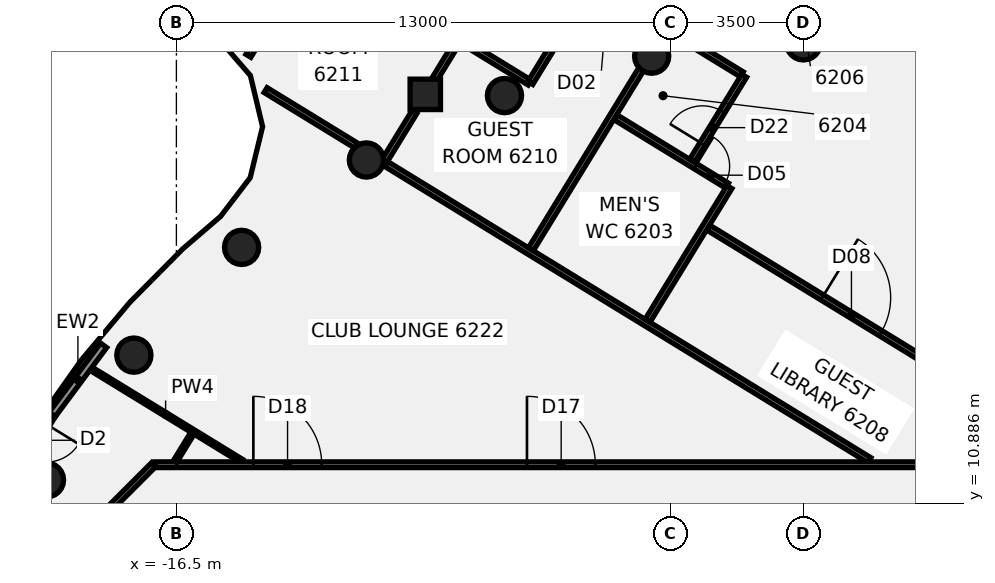
"""IFC4 building model, lengths in metres.
Left out: names, types, materials, properties, quantities, classifications, styles, units other than length and angle.
Written with IfcOpenShell. Run it as: python <this file> out.ifc"""

import sys

from ifc_helpers import new_model, si_unit, direction, frame, frame_2d, origin, origin_2d, place, context, subcontext, project, spatial, rectangle, circle, extrude, element, fill, save


model = new_model("IFC4")
c1 = context("Model", 3, precision=1e-05, world=origin(), true_north=direction((0.0, 1.0)))
c2 = subcontext(c1, "Body", "Model", "MODEL_VIEW")
j1 = project(units=[si_unit("LENGTHUNIT", "METRE"), si_unit("PLANEANGLEUNIT", "RADIAN")], contexts=[c1])
p1 = place(None, origin())
s1 = spatial("IfcSite", under=j1, at=p1, CompositionType="ELEMENT")
p2 = place(p1, origin())
s2 = spatial("IfcBuilding", under=s1, at=p2, CompositionType="ELEMENT")
p3 = place(p2, frame((0.0, 0.0, 245.1)))
s3 = spatial("IfcBuildingStorey", under=s2, at=p3, CompositionType="ELEMENT", Elevation=245.1)
for number, where, z_axis, x_axis in (
    (1, (0.0, 23.0, -0.14), (0.0, 0.0, 1.0), (1.0, 0.0, 0.0)),
    (2, (-3.994, 22.651, -0.14), (0.0, 0.0, 1.0), (1.0, 0.0, 0.0)),
    (3, (-7.866, 21.613, -0.14), (0.0, 0.0, 1.0), (1.0, 0.0, 0.0)),
    (4, (-11.5, 19.919, -0.14), (0.0, 0.0, 1.0), (1.0, 0.0, 0.0)),
    (5, (-14.784, 17.619, -0.14), (0.0, 0.0, 1.0), (1.0, 0.0, 0.0)),
    (6, (-17.619, 14.784, -0.14), (0.0, 0.0, 1.0), (1.0, 0.0, 0.0)),
    (7, (-19.919, 11.5, -0.14), (0.0, 0.0, 1.0), (1.0, 0.0, 0.0)),
):
    element("IfcColumn", number, at=place(p3, frame(where, z_axis=z_axis, x_axis=x_axis)), inside=s3, PredefinedType="COLUMN", context=c2, shape_type="SweptSolid", body=[
        extrude(circle(Radius=0.45, at=origin_2d()), origin(), (0.0, 0.0, 1.0), 3.6),
    ])
p4 = place(p3, frame((-9.951, 21.646, -0.139), z_axis=(0.002304349187, -0.050289032263, 0.998732047753), x_axis=(0.521494023038, 0.852234898638, 0.041709249322)))
e8 = element("IfcColumn", 8, at=p4, inside=s3, PredefinedType="COLUMN", context=c2, shape_type="SweptSolid", body=[
    extrude(rectangle(XDim=0.8, YDim=0.8, at=origin_2d()), origin(), (0.0, 0.0, 1.0), 3.602),
])
p5 = place(p3, frame((-14.153, 21.758, 0.0), z_axis=(0.0, 0.0, 1.0), x_axis=(0.852608746258, -0.522549830929, 0.0)))
e9 = element("IfcWall", 9, at=p5, inside=s3, PredefinedType="PARTITIONING", context=c2, shape_type="SweptSolid", body=[
    extrude(rectangle(XDim=2.809, YDim=0.15, at=frame_2d((1.405, 0.0))), origin(), (0.0, 0.0, 1.0), 2.864),
])
p6 = place(p3, frame((-10.983, 19.815, 0.0), z_axis=(0.0, 0.0, 1.0), x_axis=(0.852616070258, -0.522537880672, 0.0)))
e10 = element("IfcWall", 10, at=p6, inside=s3, PredefinedType="PARTITIONING", context=c2, shape_type="SweptSolid", body=[
    extrude(rectangle(XDim=14.918, YDim=0.15, at=frame_2d((7.459, 0.0))), origin(), (0.0, 0.0, 1.0), 2.864),
])
p7 = place(p3, frame((-10.875, 24.206, 0.0), z_axis=(0.0, 0.0, 1.0), x_axis=(0.852560498392, -0.522628545509, 0.0)))
e11 = element("IfcWall", 11, at=p7, inside=s3, PredefinedType="PARTITIONING", context=c2, shape_type="SweptSolid", body=[
    extrude(rectangle(XDim=4.305, YDim=0.15, at=frame_2d((2.153, 0.0))), origin(), (0.0, 0.0, 1.0), 2.864),
])
p8 = place(p3, frame((-4.948, 21.044, 0.0), z_axis=(0.0, 0.0, 1.0), x_axis=(0.85258902817, -0.52258200222, 0.0)))
e12 = element("IfcWall", 12, at=p8, inside=s3, PredefinedType="PARTITIONING", context=c2, shape_type="SweptSolid", body=[
    extrude(rectangle(XDim=3.445, YDim=0.15, at=frame_2d((1.722, 0.0))), origin(), (0.0, 0.0, 1.0), 2.864),
])
p9 = place(p8, frame((2.469, 0.0, 0.0)))
e13 = element("IfcOpeningElement", 13, at=p9, cuts=e12, PredefinedType="OPENING", context=c2, shape_type="SweptSolid", body=[
    extrude(rectangle(XDim=0.9, YDim=2.1, at=frame_2d((0.45, 1.05))), frame((0.0, 0.085, 0.0), z_axis=(0.0, -1.0, 0.0), x_axis=(1.0, 0.0, 0.0)), (0.0, 0.0, 1.0), 0.17),
])
p10 = place(p3, frame((-18.78, 14.446, 0.0), z_axis=(0.0, 0.0, 1.0), x_axis=(0.85278401902, -0.522263742667, 0.0)))
e14 = element("IfcWall", 14, at=p10, inside=s3, PredefinedType="PARTITIONING", context=c2, shape_type="SweptSolid", body=[
    extrude(rectangle(XDim=4.683, YDim=0.1, at=frame_2d((2.342, 0.0))), origin(), (0.0, 0.0, 1.0), 2.864),
])
p11 = place(p3, frame((-3.521, 23.336, 0.0), z_axis=(0.0, 0.0, 1.0), x_axis=(0.852703717401, -0.522394841408, 0.0)))
e15 = element("IfcWall", 15, at=p11, inside=s3, PredefinedType="PARTITIONING", context=c2, shape_type="SweptSolid", body=[
    extrude(rectangle(XDim=2.226, YDim=0.15, at=frame_2d((1.113, 0.0))), origin(), (0.0, 0.0, 1.0), 2.864),
])
p12 = place(p3, frame((-2.506, 18.14, 0.0), z_axis=(0.0, 0.0, 1.0), x_axis=(0.85272401736, -0.522361704393, 0.0)))
e16 = element("IfcWall", 16, at=p12, inside=s3, PredefinedType="PARTITIONING", context=c2, shape_type="SweptSolid", body=[
    extrude(rectangle(XDim=11.716, YDim=0.15, at=frame_2d((5.858, 0.0))), origin(), (0.0, 0.0, 1.0), 2.864),
])
p13 = place(p12, frame((3.52, 0.0, 0.0)))
e17 = element("IfcOpeningElement", 17, at=p13, cuts=e16, PredefinedType="OPENING", context=c2, shape_type="SweptSolid", body=[
    extrude(rectangle(XDim=1.8, YDim=2.1, at=frame_2d((0.9, 1.05))), frame((0.0, 0.085, 0.0), z_axis=(0.0, -1.0, 0.0), x_axis=(1.0, 0.0, 0.0)), (0.0, 0.0, 1.0), 0.17),
])
p14 = place(p3, frame((-17.065, 11.9, 0.0), z_axis=(0.0, 0.0, 1.0), x_axis=(1.0, 0.0, 0.0)))
e18 = element("IfcWall", 18, at=p14, inside=s3, PredefinedType="PARTITIONING", context=c2, shape_type="SweptSolid", body=[
    extrude(rectangle(XDim=34.165, YDim=0.15, at=frame_2d((17.083, 0.0))), origin(), (0.0, 0.0, 1.0), 2.864),
])
p15 = place(p14, frame((25.046, 0.0, 0.0)))
e19 = element("IfcOpeningElement", 19, at=p15, cuts=e18, PredefinedType="OPENING", context=c2, shape_type="SweptSolid", body=[
    extrude(rectangle(XDim=1.8, YDim=2.1, at=frame_2d((0.9, 1.05))), frame((0.0, 0.085, 0.0), z_axis=(0.0, -1.0, 0.0), x_axis=(1.0, 0.0, 0.0)), (0.0, 0.0, 1.0), 0.17),
])
p16 = place(p14, frame((9.79, 0.0, 0.0)))
e20 = element("IfcOpeningElement", 20, at=p16, cuts=e18, PredefinedType="OPENING", context=c2, shape_type="SweptSolid", body=[
    extrude(rectangle(XDim=1.8, YDim=2.1, at=frame_2d((0.9, 1.05))), frame((0.0, 0.085, 0.0), z_axis=(0.0, -1.0, 0.0), x_axis=(1.0, 0.0, 0.0)), (0.0, 0.0, 1.0), 0.17),
])
p17 = place(p14, frame((2.59, 0.0, 0.0)))
e21 = element("IfcOpeningElement", 21, at=p17, cuts=e18, PredefinedType="OPENING", context=c2, shape_type="SweptSolid", body=[
    extrude(rectangle(XDim=1.8, YDim=2.1, at=frame_2d((0.9, 1.05))), frame((0.0, 0.085, 0.0), z_axis=(0.0, -1.0, 0.0), x_axis=(1.0, 0.0, 0.0)), (0.0, 0.0, 1.0), 0.17),
])
p18 = place(p3, frame((-18.872, 10.128, 0.0), z_axis=(0.0, 0.0, 1.0), x_axis=(0.707106781187, 0.707106781187, 0.0)))
e22 = element("IfcWall", 22, at=p18, inside=s3, PredefinedType="PARTITIONING", context=c2, shape_type="SweptSolid", body=[
    extrude(rectangle(XDim=2.505, YDim=0.15, at=frame_2d((1.253, 0.0))), origin(), (0.0, 0.0, 1.0), 2.864),
])
p19 = place(p3, frame((-16.535, 11.985, 0.0), z_axis=(0.0, 0.0, 1.0), x_axis=(0.522633992849, 0.852557159092, 0.0)))
e23 = element("IfcWall", 23, at=p19, inside=s3, PredefinedType="PARTITIONING", context=c2, shape_type="SweptSolid", body=[
    extrude(rectangle(XDim=0.875, YDim=0.1, at=frame_2d((0.438, 0.0))), origin(), (0.0, 0.0, 1.0), 2.864),
])
p20 = place(p3, frame((-11.049, 19.855, 0.0), z_axis=(0.0, 0.0, 1.0), x_axis=(0.5226912647, 0.852522047695, 0.0)))
e24 = element("IfcWall", 24, at=p20, inside=s3, PredefinedType="PARTITIONING", context=c2, shape_type="SweptSolid", body=[
    extrude(rectangle(XDim=1.551, YDim=0.15, at=frame_2d((0.775, 0.0))), origin(), (0.0, 0.0, 1.0), 2.864),
])
p21 = place(p3, frame((-9.74, 21.99, 0.0), z_axis=(0.0, 0.0, 1.0), x_axis=(0.522590556225, 0.852583785058, 0.0)))
e25 = element("IfcWall", 25, at=p21, inside=s3, PredefinedType="PARTITIONING", context=c2, shape_type="SweptSolid", body=[
    extrude(rectangle(XDim=3.817, YDim=0.15, at=frame_2d((1.908, 0.0))), origin(), (0.0, 0.0, 1.0), 2.864),
])
p22 = place(p3, frame((-7.187, 21.946, 0.0), z_axis=(0.0, 0.0, 1.0), x_axis=(0.522621117444, 0.85256505183, 0.0)))
e26 = element("IfcWall", 26, at=p22, inside=s3, PredefinedType="PARTITIONING", context=c2, shape_type="SweptSolid", body=[
    extrude(rectangle(XDim=2.52, YDim=0.15, at=frame_2d((1.26, 0.0))), origin(), (0.0, 0.0, 1.0), 2.864),
])
p23 = place(p22, frame((1.05, 0.0, 0.0)))
e27 = element("IfcOpeningElement", 27, at=p23, cuts=e26, PredefinedType="OPENING", context=c2, shape_type="SweptSolid", body=[
    extrude(rectangle(XDim=0.9, YDim=2.1, at=frame_2d((0.45, 1.05))), frame((0.0, 0.085, 0.0), z_axis=(0.0, -1.0, 0.0), x_axis=(1.0, 0.0, 0.0)), (0.0, 0.0, 1.0), 0.17),
])
p24 = place(p3, frame((-2.928, 19.9, 0.0), z_axis=(0.0, 0.0, 1.0), x_axis=(0.522557687872, 0.852603930818, 0.0)))
e28 = element("IfcWall", 28, at=p24, inside=s3, PredefinedType="PARTITIONING", context=c2, shape_type="SweptSolid", body=[
    extrude(rectangle(XDim=2.62, YDim=0.15, at=frame_2d((1.31, 0.0))), origin(), (0.0, 0.0, 1.0), 2.864),
])
p25 = place(p24, frame((0.52, 0.0, 0.0)))
e29 = element("IfcOpeningElement", 29, at=p25, cuts=e28, PredefinedType="OPENING", context=c2, shape_type="SweptSolid", body=[
    extrude(rectangle(XDim=1.0, YDim=2.1, at=frame_2d((0.5, 1.05))), frame((0.0, 0.085, 0.0), z_axis=(0.0, -1.0, 0.0), x_axis=(1.0, 0.0, 0.0)), (0.0, 0.0, 1.0), 0.17),
])
p26 = place(p3, frame((-7.17, 17.573, 0.0), z_axis=(0.0, 0.0, 1.0), x_axis=(0.522586882087, 0.852586037107, 0.0)))
e30 = element("IfcWall", 30, at=p26, inside=s3, PredefinedType="PARTITIONING", context=c2, shape_type="SweptSolid", body=[
    extrude(rectangle(XDim=5.765, YDim=0.15, at=frame_2d((2.883, 0.0))), origin(), (0.0, 0.0, 1.0), 2.864),
])
p27 = place(p3, frame((-4.102, 15.688, 0.0), z_axis=(0.0, 0.0, 1.0), x_axis=(0.522524582704, 0.852624219965, 0.0)))
e31 = element("IfcWall", 31, at=p27, inside=s3, PredefinedType="PARTITIONING", context=c2, shape_type="SweptSolid", body=[
    extrude(rectangle(XDim=4.125, YDim=0.15, at=frame_2d((2.062, 0.0))), origin(), (0.0, 0.0, 1.0), 2.864),
])
p28 = place(p3, frame((-14.606, 22.661, 0.0), z_axis=(0.0, 0.0, 1.0), x_axis=(0.522270484335, 0.852779890237, 0.0)))
e32 = element("IfcWall", 32, at=p28, inside=s3, PredefinedType="PARTITIONING", context=c2, shape_type="SweptSolid", body=[
    extrude(rectangle(XDim=13.765, YDim=0.15, at=frame_2d((6.883, 0.0))), origin(), (0.0, 0.0, 1.0), 2.864),
])
p29 = place(p28, frame((6.166, 0.0, 0.0)))
e33 = element("IfcOpeningElement", 33, at=p29, cuts=e32, PredefinedType="OPENING", context=c2, shape_type="SweptSolid", body=[
    extrude(rectangle(XDim=1.8, YDim=2.1, at=frame_2d((0.9, 1.05))), frame((0.0, 0.085, 0.0), z_axis=(0.0, -1.0, 0.0), x_axis=(1.0, 0.0, 0.0)), (0.0, 0.0, 1.0), 0.17),
])
p30 = place(p3, frame((-18.416, 15.041, 0.0), z_axis=(0.0, 0.0, 1.0), x_axis=(-0.59704626728, -0.802206802967, 0.0)))
e34 = element("IfcWall", 34, at=p30, inside=s3, PredefinedType="SOLIDWALL", context=c2, shape_type="SweptSolid", body=[
    extrude(rectangle(XDim=2.265, YDim=0.2, at=frame_2d((1.132, 0.0))), origin(), (0.0, 0.0, 1.0), 3.46),
])
p31 = place(p3, frame((-19.768, 13.225, 0.0), z_axis=(0.0, 0.0, 1.0), x_axis=(-0.524140017295, -0.851632105002, 0.0)))
e35 = element("IfcWall", 35, at=p31, inside=s3, PredefinedType="SOLIDWALL", context=c2, shape_type="SweptSolid", body=[
    extrude(rectangle(XDim=1.599, YDim=0.2, at=frame_2d((0.8, 0.0))), origin(), (0.0, 0.0, 1.0), 3.46),
])
p32 = place(p31, frame((0.3, 0.0, 0.0)))
e36 = element("IfcOpeningElement", 36, at=p32, cuts=e35, PredefinedType="OPENING", context=c2, shape_type="SweptSolid", body=[
    extrude(rectangle(XDim=1.0, YDim=2.4, at=frame_2d((0.5, 1.2))), frame((0.0, 0.11, 0.0), z_axis=(0.0, -1.0, 0.0), x_axis=(1.0, 0.0, 0.0)), (0.0, 0.0, 1.0), 0.22),
])
p33 = place(p9, frame((0.9, 0.0, 0.0), z_axis=(0.0, 0.0, 1.0), x_axis=(-1.0, 0.0, 0.0)))
e37 = element("IfcDoor", 37, at=p33, inside=s3, OperationType="SINGLE_SWING_RIGHT", PredefinedType="DOOR", context=c2, shape_type="SweptSolid", body=[
    extrude(rectangle(XDim=0.9, YDim=2.1, at=frame_2d((0.45, 1.05))), frame((0.0, 0.025, 0.0), z_axis=(0.0, -1.0, 0.0), x_axis=(1.0, 0.0, 0.0)), (0.0, 0.0, 1.0), 0.05),
])
fill(e13, e37)
p34 = place(p13, frame((1.8, 0.0, 0.0), z_axis=(0.0, 0.0, 1.0), x_axis=(-1.0, 0.0, 0.0)))
e38 = element("IfcDoor", 38, at=p34, inside=s3, OperationType="DOUBLE_DOOR_SINGLE_SWING", PredefinedType="DOOR", context=c2, shape_type="SweptSolid", body=[
    extrude(rectangle(XDim=1.8, YDim=2.1, at=frame_2d((0.9, 1.05))), frame((0.0, 0.025, 0.0), z_axis=(0.0, -1.0, 0.0), x_axis=(1.0, 0.0, 0.0)), (0.0, 0.0, 1.0), 0.05),
])
fill(e17, e38)
p35 = place(p16, origin())
e39 = element("IfcDoor", 39, at=p35, inside=s3, OperationType="DOUBLE_DOOR_SINGLE_SWING", PredefinedType="DOOR", context=c2, shape_type="SweptSolid", body=[
    extrude(rectangle(XDim=1.8, YDim=2.1, at=frame_2d((0.9, 1.05))), frame((0.0, 0.025, 0.0), z_axis=(0.0, -1.0, 0.0), x_axis=(1.0, 0.0, 0.0)), (0.0, 0.0, 1.0), 0.05),
])
fill(e20, e39)
p36 = place(p17, origin())
e40 = element("IfcDoor", 40, at=p36, inside=s3, OperationType="DOUBLE_DOOR_SINGLE_SWING", PredefinedType="DOOR", context=c2, shape_type="SweptSolid", body=[
    extrude(rectangle(XDim=1.8, YDim=2.1, at=frame_2d((0.9, 1.05))), frame((0.0, 0.025, 0.0), z_axis=(0.0, -1.0, 0.0), x_axis=(1.0, 0.0, 0.0)), (0.0, 0.0, 1.0), 0.05),
])
fill(e21, e40)
p37 = place(p25, origin())
e41 = element("IfcDoor", 41, at=p37, inside=s3, OperationType="SINGLE_SWING_RIGHT", PredefinedType="DOOR", context=c2, shape_type="SweptSolid", body=[
    extrude(rectangle(XDim=1.0, YDim=2.1, at=frame_2d((0.5, 1.05))), frame((0.0, 0.025, 0.0), z_axis=(0.0, -1.0, 0.0), x_axis=(1.0, 0.0, 0.0)), (0.0, 0.0, 1.0), 0.05),
])
fill(e29, e41)
save(model, sys.argv[1])
